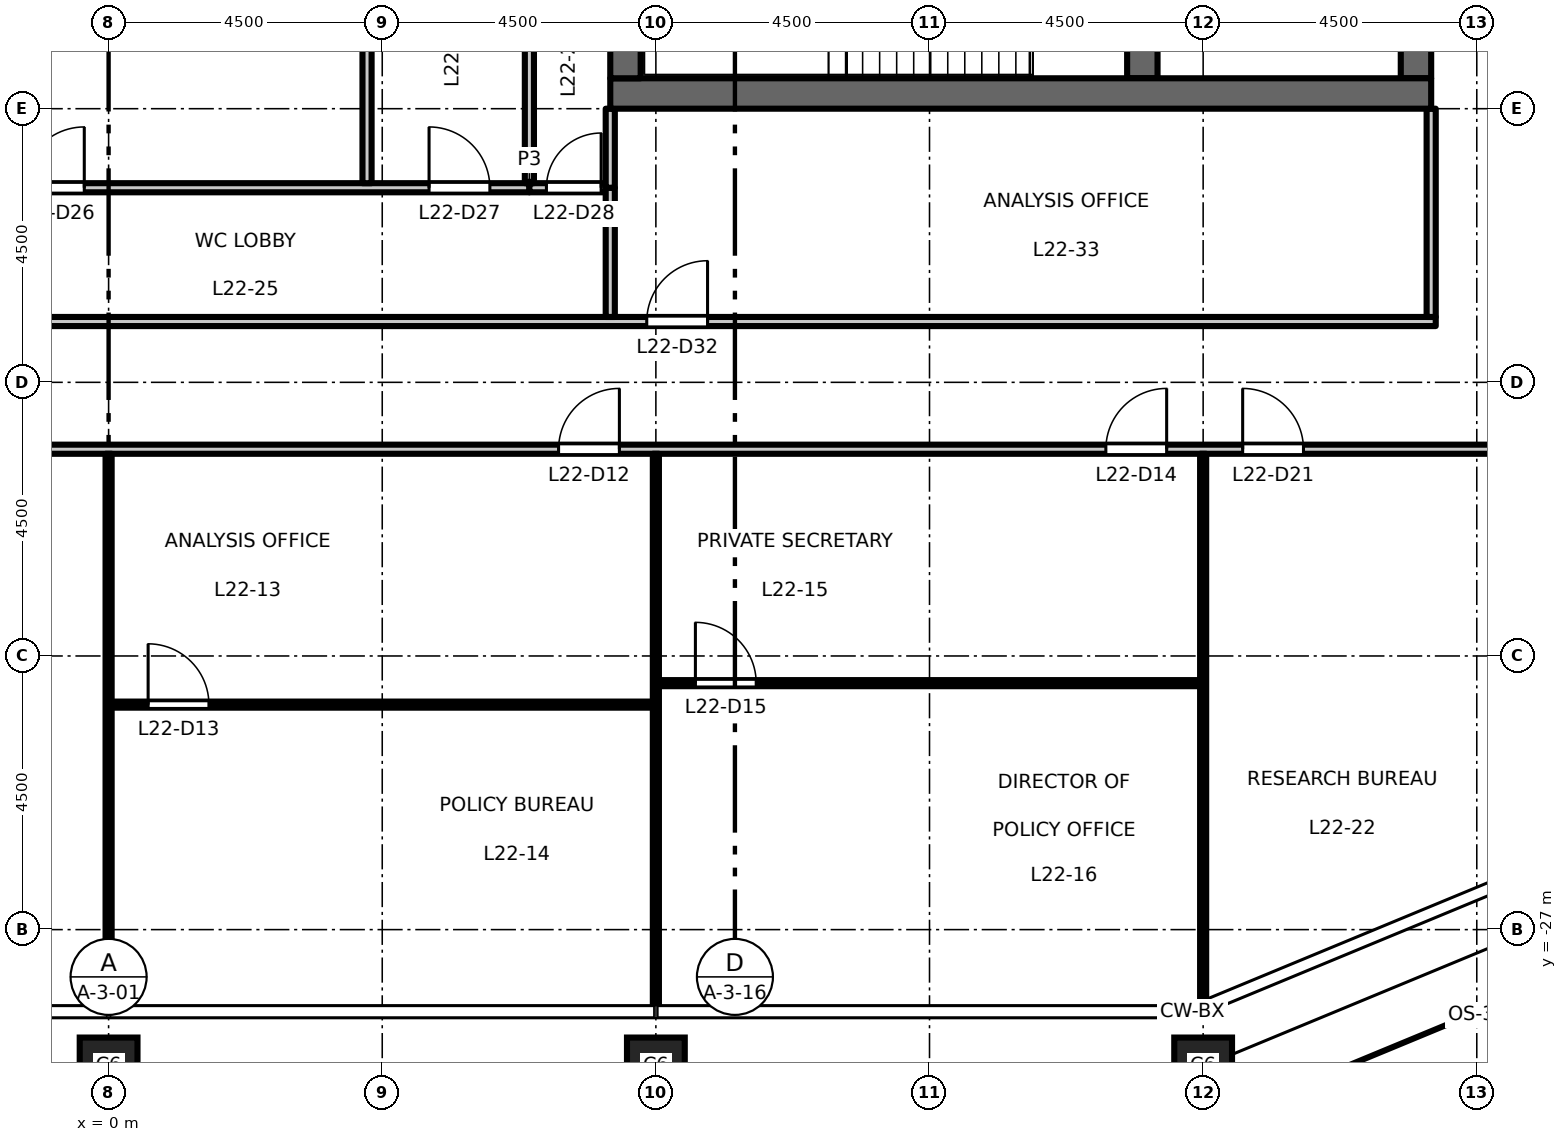
"""IFC4 building model, lengths in metres.
Left out: names, types, materials, properties, quantities, classifications, styles, units other than length and angle.
Written with IfcOpenShell. Run it as: python <this file> out.ifc"""

import sys

from ifc_helpers import new_model, si_unit, direction, frame, frame_2d, origin, origin_2d, place, context, subcontext, project, spatial, rectangle, hollow_rectangle, extrude, element, fill, save


model = new_model("IFC4")
c1 = context("Model", 3, precision=1e-05, world=origin(), true_north=direction((0.0, 1.0)))
c2 = subcontext(c1, "Body", "Model", "MODEL_VIEW")
j1 = project(units=[si_unit("LENGTHUNIT", "METRE"), si_unit("PLANEANGLEUNIT", "RADIAN")], contexts=[c1])
p1 = place(None, origin())
s1 = spatial("IfcSite", under=j1, at=p1, CompositionType="ELEMENT")
p2 = place(p1, origin())
s2 = spatial("IfcBuilding", under=s1, at=p2, CompositionType="ELEMENT")
p3 = place(p2, frame((0.0, 0.0, 104.7)))
s3 = spatial("IfcBuildingStorey", under=s2, at=p3, CompositionType="ELEMENT", Elevation=104.7)
for number, where, z_axis, x_axis in (
    (1, (0.0, -29.25, 0.0), (0.0, 0.0, 1.0), (1.0, 0.0, 0.0)),
    (2, (9.0, -29.25, 0.0), (0.0, 0.0, 1.0), (1.0, 0.0, 0.0)),
    (3, (18.0, -29.25, 0.0), (0.0, 0.0, 1.0), (1.0, 0.0, 0.0)),
):
    element("IfcColumn", number, at=place(p3, frame(where, z_axis=z_axis, x_axis=x_axis)), inside=s3, PredefinedType="COLUMN", context=c2, shape_type="SweptSolid", body=[
        extrude(hollow_rectangle(XDim=0.95, YDim=0.95, WallThickness=0.055, at=origin_2d()), origin(), (0.0, 0.0, 1.0), 4.5),
    ])
p4 = place(p3, frame((21.5, -13.0, 0.0), z_axis=(0.0, 0.0, 1.0), x_axis=(0.0, 1.0, 0.0)))
e4 = element("IfcWall", 4, at=p4, inside=s3, PredefinedType="SHEAR", context=c2, shape_type="SweptSolid", body=[
    extrude(rectangle(XDim=26.0, YDim=0.5, at=frame_2d((13.0, 0.0))), origin(), (0.0, 0.0, 1.0), 4.35),
])
p5 = place(p4, frame((16.825, 0.0, 0.0)))
e5 = element("IfcOpeningElement", 5, at=p5, cuts=e4, PredefinedType="OPENING", context=c2, shape_type="SweptSolid", body=[
    extrude(rectangle(XDim=1.8, YDim=2.1, at=frame_2d((0.9, 1.05))), frame((0.0, 0.26, 0.0), z_axis=(0.0, -1.0, 0.0), x_axis=(1.0, 0.0, 0.0)), (0.0, 0.0, 1.0), 0.52),
])
p6 = place(p4, frame((7.375, 0.0, 0.0)))
e6 = element("IfcOpeningElement", 6, at=p6, cuts=e4, PredefinedType="OPENING", context=c2, shape_type="SweptSolid", body=[
    extrude(rectangle(XDim=1.8, YDim=2.1, at=frame_2d((0.9, 1.05))), frame((0.0, 0.26, 0.0), z_axis=(0.0, -1.0, 0.0), x_axis=(1.0, 0.0, 0.0)), (0.0, 0.0, 1.0), 0.52),
])
p7 = place(p3, frame((17.0, -13.0, 0.0), z_axis=(0.0, 0.0, 1.0), x_axis=(0.0, 1.0, 0.0)))
e7 = element("IfcWall", 7, at=p7, inside=s3, PredefinedType="SHEAR", context=c2, shape_type="SweptSolid", body=[
    extrude(rectangle(XDim=6.575, YDim=0.5, at=frame_2d((3.288, 0.0))), origin(), (0.0, 0.0, 1.0), 4.35),
])
p8 = place(p3, frame((8.25, -13.25, 0.0), z_axis=(0.0, 0.0, 1.0), x_axis=(1.0, 0.0, 0.0)))
e8 = element("IfcWall", 8, at=p8, inside=s3, PredefinedType="SHEAR", context=c2, shape_type="SweptSolid", body=[
    extrude(rectangle(XDim=13.5, YDim=0.5, at=frame_2d((6.75, 0.0))), origin(), (0.0, 0.0, 1.0), 4.35),
])
p9 = place(p3, frame((8.5, -13.0, 0.0), z_axis=(0.0, 0.0, 1.0), x_axis=(0.0, 1.0, 0.0)))
e9 = element("IfcWall", 9, at=p9, inside=s3, PredefinedType="SHEAR", context=c2, shape_type="SweptSolid", body=[
    extrude(rectangle(XDim=26.0, YDim=0.5, at=frame_2d((13.0, 0.0))), origin(), (0.0, 0.0, 1.0), 4.35),
])
p10 = place(p3, frame((0.05, -23.3, 0.0), z_axis=(0.0, 0.0, 1.0), x_axis=(1.0, 0.0, 0.0)))
e10 = element("IfcWall", 10, at=p10, inside=s3, PredefinedType="PARTITIONING", context=c2, shape_type="SweptSolid", body=[
    extrude(rectangle(XDim=8.9, YDim=0.1, at=frame_2d((4.45, 0.0))), origin(), (0.0, 0.0, 1.0), 4.35),
])
p11 = place(p10, frame((0.6, 0.0, 0.0)))
e11 = element("IfcOpeningElement", 11, at=p11, cuts=e10, PredefinedType="OPENING", context=c2, shape_type="SweptSolid", body=[
    extrude(rectangle(XDim=1.0, YDim=2.1, at=frame_2d((0.5, 1.05))), frame((0.0, 0.06, 0.0), z_axis=(0.0, -1.0, 0.0), x_axis=(1.0, 0.0, 0.0)), (0.0, 0.0, 1.0), 0.12),
])
p12 = place(p3, frame((9.05, -22.947, 0.0), z_axis=(0.0, 0.0, 1.0), x_axis=(1.0, 0.0, 0.0)))
e12 = element("IfcWall", 12, at=p12, inside=s3, PredefinedType="PARTITIONING", context=c2, shape_type="SweptSolid", body=[
    extrude(rectangle(XDim=8.9, YDim=0.1, at=frame_2d((4.45, 0.0))), origin(), (0.0, 0.0, 1.0), 4.35),
])
p13 = place(p12, frame((0.6, 0.0, 0.0)))
e13 = element("IfcOpeningElement", 13, at=p13, cuts=e12, PredefinedType="OPENING", context=c2, shape_type="SweptSolid", body=[
    extrude(rectangle(XDim=1.0, YDim=2.1, at=frame_2d((0.5, 1.05))), frame((0.0, 0.06, 0.0), z_axis=(0.0, -1.0, 0.0), x_axis=(1.0, 0.0, 0.0)), (0.0, 0.0, 1.0), 0.12),
])
p14 = place(p3, frame((-27.723, -19.1, 0.0), z_axis=(0.0, 0.0, 1.0), x_axis=(1.0, 0.0, 0.0)))
e14 = element("IfcWall", 14, at=p14, inside=s3, PredefinedType="PARTITIONING", context=c2, shape_type="SweptSolid", body=[
    extrude(rectangle(XDim=55.446, YDim=0.15, at=frame_2d((27.723, 0.0))), origin(), (0.0, 0.0, 1.0), 4.35),
])
p15 = place(p14, frame((10.373, 0.0, 0.0)))
e15 = element("IfcOpeningElement", 15, at=p15, cuts=e14, PredefinedType="OPENING", context=c2, shape_type="SweptSolid", body=[
    extrude(rectangle(XDim=1.0, YDim=2.1, at=frame_2d((0.5, 1.05))), frame((0.0, 0.085, 0.0), z_axis=(0.0, -1.0, 0.0), x_axis=(1.0, 0.0, 0.0)), (0.0, 0.0, 1.0), 0.17),
])
p16 = place(p14, frame((19.373, 0.0, 0.0)))
e16 = element("IfcOpeningElement", 16, at=p16, cuts=e14, PredefinedType="OPENING", context=c2, shape_type="SweptSolid", body=[
    extrude(rectangle(XDim=1.0, YDim=2.1, at=frame_2d((0.5, 1.05))), frame((0.0, 0.085, 0.0), z_axis=(0.0, -1.0, 0.0), x_axis=(1.0, 0.0, 0.0)), (0.0, 0.0, 1.0), 0.17),
])
p17 = place(p14, frame((35.123, 0.0, 0.0)))
e17 = element("IfcOpeningElement", 17, at=p17, cuts=e14, PredefinedType="OPENING", context=c2, shape_type="SweptSolid", body=[
    extrude(rectangle(XDim=1.0, YDim=2.1, at=frame_2d((0.5, 1.05))), frame((0.0, 0.085, 0.0), z_axis=(0.0, -1.0, 0.0), x_axis=(1.0, 0.0, 0.0)), (0.0, 0.0, 1.0), 0.17),
])
p18 = place(p14, frame((44.123, 0.0, 0.0)))
e18 = element("IfcOpeningElement", 18, at=p18, cuts=e14, PredefinedType="OPENING", context=c2, shape_type="SweptSolid", body=[
    extrude(rectangle(XDim=1.0, YDim=2.1, at=frame_2d((0.5, 1.05))), frame((0.0, 0.085, 0.0), z_axis=(0.0, -1.0, 0.0), x_axis=(1.0, 0.0, 0.0)), (0.0, 0.0, 1.0), 0.17),
])
p19 = place(p14, frame((0.65, 0.0, 0.0)))
e19 = element("IfcOpeningElement", 19, at=p19, cuts=e14, PredefinedType="OPENING", context=c2, shape_type="SweptSolid", body=[
    extrude(rectangle(XDim=1.0, YDim=2.1, at=frame_2d((0.5, 1.05))), frame((0.0, 0.085, 0.0), z_axis=(0.0, -1.0, 0.0), x_axis=(1.0, 0.0, 0.0)), (0.0, 0.0, 1.0), 0.17),
])
p20 = place(p14, frame((46.373, 0.0, 0.0)))
e20 = element("IfcOpeningElement", 20, at=p20, cuts=e14, PredefinedType="OPENING", context=c2, shape_type="SweptSolid", body=[
    extrude(rectangle(XDim=1.0, YDim=2.1, at=frame_2d((0.5, 1.05))), frame((0.0, 0.085, 0.0), z_axis=(0.0, -1.0, 0.0), x_axis=(1.0, 0.0, 0.0)), (0.0, 0.0, 1.0), 0.17),
])
p21 = place(p3, frame((-21.825, -17.0, 0.0), z_axis=(0.0, 0.0, 1.0), x_axis=(1.0, 0.0, 0.0)))
e21 = element("IfcWall", 21, at=p21, inside=s3, PredefinedType="PARTITIONING", context=c2, shape_type="SweptSolid", body=[
    extrude(rectangle(XDim=43.65, YDim=0.15, at=frame_2d((21.825, 0.0))), origin(), (0.0, 0.0, 1.0), 4.35),
])
p22 = place(p21, frame((14.175, 0.0, 0.0)))
e22 = element("IfcOpeningElement", 22, at=p22, cuts=e21, PredefinedType="OPENING", context=c2, shape_type="SweptSolid", body=[
    extrude(rectangle(XDim=1.0, YDim=2.1, at=frame_2d((0.5, 1.05))), frame((0.0, 0.085, 0.0), z_axis=(0.0, -1.0, 0.0), x_axis=(1.0, 0.0, 0.0)), (0.0, 0.0, 1.0), 0.17),
])
p23 = place(p21, frame((11.925, 0.0, 0.0)))
e23 = element("IfcOpeningElement", 23, at=p23, cuts=e21, PredefinedType="OPENING", context=c2, shape_type="SweptSolid", body=[
    extrude(rectangle(XDim=1.0, YDim=2.1, at=frame_2d((0.5, 1.05))), frame((0.0, 0.085, 0.0), z_axis=(0.0, -1.0, 0.0), x_axis=(1.0, 0.0, 0.0)), (0.0, 0.0, 1.0), 0.17),
])
p24 = place(p21, frame((30.675, 0.0, 0.0)))
e24 = element("IfcOpeningElement", 24, at=p24, cuts=e21, PredefinedType="OPENING", context=c2, shape_type="SweptSolid", body=[
    extrude(rectangle(XDim=1.0, YDim=2.1, at=frame_2d((0.5, 1.05))), frame((0.0, 0.085, 0.0), z_axis=(0.0, -1.0, 0.0), x_axis=(1.0, 0.0, 0.0)), (0.0, 0.0, 1.0), 0.17),
])
p25 = place(p3, frame((-8.175, -14.8, 0.0), z_axis=(0.0, 0.0, 1.0), x_axis=(1.0, 0.0, 0.0)))
e25 = element("IfcWall", 25, at=p25, inside=s3, PredefinedType="PARTITIONING", context=c2, shape_type="SweptSolid", body=[
    extrude(rectangle(XDim=15.095, YDim=0.15, at=frame_2d((7.547, 0.0))), origin(), (0.0, 0.0, 1.0), 4.35),
])
p26 = place(p25, frame((4.525, 0.0, 0.0)))
e26 = element("IfcOpeningElement", 26, at=p26, cuts=e25, PredefinedType="OPENING", context=c2, shape_type="SweptSolid", body=[
    extrude(rectangle(XDim=1.0, YDim=2.1, at=frame_2d((0.5, 1.05))), frame((0.0, 0.085, 0.0), z_axis=(0.0, -1.0, 0.0), x_axis=(1.0, 0.0, 0.0)), (0.0, 0.0, 1.0), 0.17),
])
p27 = place(p25, frame((6.775, 0.0, 0.0)))
e27 = element("IfcOpeningElement", 27, at=p27, cuts=e25, PredefinedType="OPENING", context=c2, shape_type="SweptSolid", body=[
    extrude(rectangle(XDim=1.0, YDim=2.1, at=frame_2d((0.5, 1.05))), frame((0.0, 0.085, 0.0), z_axis=(0.0, -1.0, 0.0), x_axis=(1.0, 0.0, 0.0)), (0.0, 0.0, 1.0), 0.17),
])
p28 = place(p25, frame((13.445, 0.0, 0.0)))
e28 = element("IfcOpeningElement", 28, at=p28, cuts=e25, PredefinedType="OPENING", context=c2, shape_type="SweptSolid", body=[
    extrude(rectangle(XDim=1.0, YDim=2.1, at=frame_2d((0.5, 1.05))), frame((0.0, 0.085, 0.0), z_axis=(0.0, -1.0, 0.0), x_axis=(1.0, 0.0, 0.0)), (0.0, 0.0, 1.0), 0.17),
])
p29 = place(p3, frame((6.92, -14.8, 0.0), z_axis=(0.0, 0.0, 1.0), x_axis=(1.0, 0.0, 0.0)))
e29 = element("IfcWall", 29, at=p29, inside=s3, PredefinedType="PARTITIONING", context=c2, shape_type="SweptSolid", body=[
    extrude(rectangle(XDim=1.255, YDim=0.15, at=frame_2d((0.627, 0.0))), origin(), (0.0, 0.0, 1.0), 4.35),
])
p30 = place(p29, frame((0.28, 0.0, 0.0)))
e30 = element("IfcOpeningElement", 30, at=p30, cuts=e29, PredefinedType="OPENING", context=c2, shape_type="SweptSolid", body=[
    extrude(rectangle(XDim=0.9, YDim=2.1, at=frame_2d((0.45, 1.05))), frame((0.0, 0.085, 0.0), z_axis=(0.0, -1.0, 0.0), x_axis=(1.0, 0.0, 0.0)), (0.0, 0.0, 1.0), 0.17),
])
p31 = place(p3, frame((0.0, -28.26, 0.0), z_axis=(0.0, 0.0, 1.0), x_axis=(0.0, 1.0, 0.0)))
e31 = element("IfcWall", 31, at=p31, inside=s3, PredefinedType="PARTITIONING", context=c2, shape_type="SweptSolid", body=[
    extrude(rectangle(XDim=9.085, YDim=0.1, at=frame_2d((4.542, 0.0))), origin(), (0.0, 0.0, 1.0), 3.45),
])
p32 = place(p3, frame((4.25, -14.725, 0.0), z_axis=(0.0, 0.0, 1.0), x_axis=(0.0, 1.0, 0.0)))
e32 = element("IfcWall", 32, at=p32, inside=s3, PredefinedType="PARTITIONING", context=c2, shape_type="SweptSolid", body=[
    extrude(rectangle(XDim=6.355, YDim=0.15, at=frame_2d((3.177, 0.0))), origin(), (0.0, 0.0, 1.0), 4.35),
])
p33 = place(p3, frame((6.92, -14.725, 0.0), z_axis=(0.0, 0.0, 1.0), x_axis=(0.0, 1.0, 0.0)))
e33 = element("IfcWall", 33, at=p33, inside=s3, PredefinedType="PARTITIONING", context=c2, shape_type="SweptSolid", body=[
    extrude(rectangle(XDim=6.7, YDim=0.15, at=frame_2d((3.35, 0.0))), origin(), (0.0, 0.0, 1.0), 4.35),
])
p34 = place(p3, frame((8.25, -16.925, 0.0), z_axis=(0.0, 0.0, 1.0), x_axis=(0.0, 1.0, 0.0)))
e34 = element("IfcWall", 34, at=p34, inside=s3, PredefinedType="PARTITIONING", context=c2, shape_type="SweptSolid", body=[
    extrude(rectangle(XDim=2.125, YDim=0.15, at=frame_2d((1.062, 0.0))), origin(), (0.0, 0.0, 1.0), 4.35),
])
p35 = place(p3, frame((8.25, -14.8, 0.0), z_axis=(0.0, 0.0, 1.0), x_axis=(0.0, 1.0, 0.0)))
e35 = element("IfcWall", 35, at=p35, inside=s3, PredefinedType="PARTITIONING", context=c2, shape_type="SweptSolid", body=[
    extrude(rectangle(XDim=1.3, YDim=0.15, at=frame_2d((0.65, 0.0))), origin(), (0.0, 0.0, 1.0), 4.35),
])
p36 = place(p3, frame((9.0, -28.26, 0.0), z_axis=(0.0, 0.0, 1.0), x_axis=(0.0, 1.0, 0.0)))
e36 = element("IfcWall", 36, at=p36, inside=s3, PredefinedType="PARTITIONING", context=c2, shape_type="SweptSolid", body=[
    extrude(rectangle(XDim=9.085, YDim=0.1, at=frame_2d((4.542, 0.0))), origin(), (0.0, 0.0, 1.0), 3.45),
])
p37 = place(p3, frame((18.0, -28.178, 0.0), z_axis=(0.0, 0.0, 1.0), x_axis=(0.0, 1.0, 0.0)))
e37 = element("IfcWall", 37, at=p37, inside=s3, PredefinedType="PARTITIONING", context=c2, shape_type="SweptSolid", body=[
    extrude(rectangle(XDim=9.003, YDim=0.1, at=frame_2d((4.501, 0.0))), origin(), (0.0, 0.0, 1.0), 3.45),
])
p38 = place(p3, frame((21.75, -16.925, 0.0), z_axis=(0.0, 0.0, 1.0), x_axis=(0.0, 1.0, 0.0)))
e38 = element("IfcWall", 38, at=p38, inside=s3, PredefinedType="PARTITIONING", context=c2, shape_type="SweptSolid", body=[
    extrude(rectangle(XDim=3.425, YDim=0.15, at=frame_2d((1.712, 0.0))), origin(), (0.0, 0.0, 1.0), 4.35),
])
p39 = place(p17, origin())
e39 = element("IfcDoor", 39, at=p39, inside=s3, OperationType="SINGLE_SWING_RIGHT", PredefinedType="DOOR", context=c2, shape_type="SweptSolid", body=[
    extrude(rectangle(XDim=1.0, YDim=2.1, at=frame_2d((0.5, 1.05))), frame((0.0, 0.025, 0.0), z_axis=(0.0, -1.0, 0.0), x_axis=(1.0, 0.0, 0.0)), (0.0, 0.0, 1.0), 0.05),
])
fill(e17, e39)
p40 = place(p11, origin())
e40 = element("IfcDoor", 40, at=p40, inside=s3, OperationType="SINGLE_SWING_LEFT", PredefinedType="DOOR", context=c2, shape_type="SweptSolid", body=[
    extrude(rectangle(XDim=1.0, YDim=2.1, at=frame_2d((0.5, 1.05))), frame((0.0, 0.025, 0.0), z_axis=(0.0, -1.0, 0.0), x_axis=(1.0, 0.0, 0.0)), (0.0, 0.0, 1.0), 0.05),
])
fill(e11, e40)
p41 = place(p18, origin())
e41 = element("IfcDoor", 41, at=p41, inside=s3, OperationType="SINGLE_SWING_RIGHT", PredefinedType="DOOR", context=c2, shape_type="SweptSolid", body=[
    extrude(rectangle(XDim=1.0, YDim=2.1, at=frame_2d((0.5, 1.05))), frame((0.0, 0.025, 0.0), z_axis=(0.0, -1.0, 0.0), x_axis=(1.0, 0.0, 0.0)), (0.0, 0.0, 1.0), 0.05),
])
fill(e18, e41)
p42 = place(p13, origin())
e42 = element("IfcDoor", 42, at=p42, inside=s3, OperationType="SINGLE_SWING_LEFT", PredefinedType="DOOR", context=c2, shape_type="SweptSolid", body=[
    extrude(rectangle(XDim=1.0, YDim=2.1, at=frame_2d((0.5, 1.05))), frame((0.0, 0.025, 0.0), z_axis=(0.0, -1.0, 0.0), x_axis=(1.0, 0.0, 0.0)), (0.0, 0.0, 1.0), 0.05),
])
fill(e13, e42)
p43 = place(p20, origin())
e43 = element("IfcDoor", 43, at=p43, inside=s3, OperationType="SINGLE_SWING_LEFT", PredefinedType="DOOR", context=c2, shape_type="SweptSolid", body=[
    extrude(rectangle(XDim=1.0, YDim=2.1, at=frame_2d((0.5, 1.05))), frame((0.0, 0.025, 0.0), z_axis=(0.0, -1.0, 0.0), x_axis=(1.0, 0.0, 0.0)), (0.0, 0.0, 1.0), 0.05),
])
fill(e20, e43)
p44 = place(p27, origin())
e44 = element("IfcDoor", 44, at=p44, inside=s3, OperationType="SINGLE_SWING_RIGHT", PredefinedType="DOOR", context=c2, shape_type="SweptSolid", body=[
    extrude(rectangle(XDim=1.0, YDim=2.1, at=frame_2d((0.5, 1.05))), frame((0.0, 0.025, 0.0), z_axis=(0.0, -1.0, 0.0), x_axis=(1.0, 0.0, 0.0)), (0.0, 0.0, 1.0), 0.05),
])
fill(e27, e44)
p45 = place(p28, origin())
e45 = element("IfcDoor", 45, at=p45, inside=s3, OperationType="SINGLE_SWING_LEFT", PredefinedType="DOOR", context=c2, shape_type="SweptSolid", body=[
    extrude(rectangle(XDim=1.0, YDim=2.1, at=frame_2d((0.5, 1.05))), frame((0.0, 0.025, 0.0), z_axis=(0.0, -1.0, 0.0), x_axis=(1.0, 0.0, 0.0)), (0.0, 0.0, 1.0), 0.05),
])
fill(e28, e45)
p46 = place(p30, origin())
e46 = element("IfcDoor", 46, at=p46, inside=s3, OperationType="SINGLE_SWING_RIGHT", PredefinedType="DOOR", context=c2, shape_type="SweptSolid", body=[
    extrude(rectangle(XDim=0.9, YDim=2.1, at=frame_2d((0.45, 1.05))), frame((0.0, 0.025, 0.0), z_axis=(0.0, -1.0, 0.0), x_axis=(1.0, 0.0, 0.0)), (0.0, 0.0, 1.0), 0.05),
])
fill(e30, e46)
p47 = place(p24, origin())
e47 = element("IfcDoor", 47, at=p47, inside=s3, OperationType="SINGLE_SWING_RIGHT", PredefinedType="DOOR", context=c2, shape_type="SweptSolid", body=[
    extrude(rectangle(XDim=1.0, YDim=2.1, at=frame_2d((0.5, 1.05))), frame((0.0, 0.025, 0.0), z_axis=(0.0, -1.0, 0.0), x_axis=(1.0, 0.0, 0.0)), (0.0, 0.0, 1.0), 0.05),
])
fill(e24, e47)
save(model, sys.argv[1])
